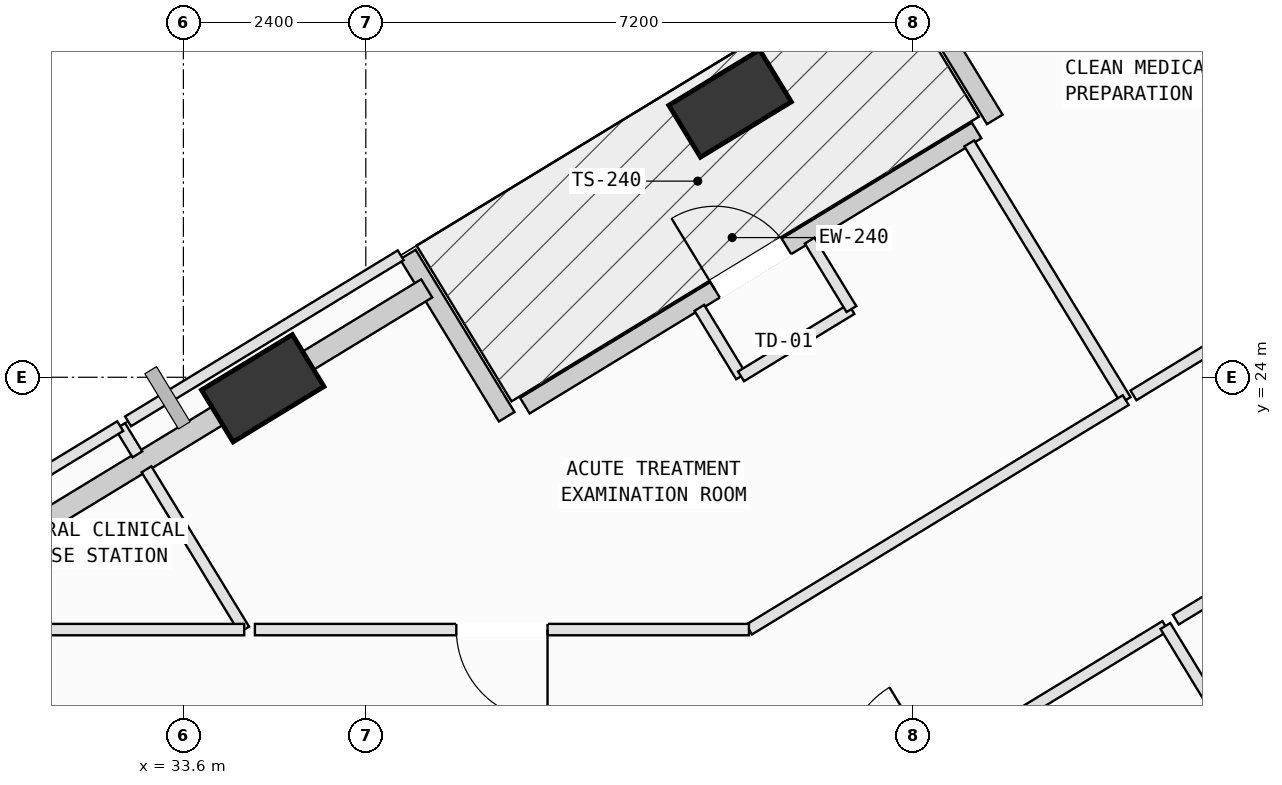
"""IFC4 building model, lengths in metres.
Left out: names, types, materials, properties, quantities, classifications, styles, units other than length and angle.
Written with IfcOpenShell. Run it as: python <this file> out.ifc"""

import sys

from ifc_helpers import new_model, si_unit, direction, frame, frame_2d, origin, origin_2d, place, context, subcontext, project, spatial, rectangle, extrude, element, fill, save


model = new_model("IFC4")
c1 = context("Model", 3, precision=1e-05, world=origin(), true_north=direction((0.0, 1.0)))
c2 = subcontext(c1, "Body", "Model", "MODEL_VIEW")
j1 = project(units=[si_unit("LENGTHUNIT", "METRE"), si_unit("PLANEANGLEUNIT", "RADIAN")], contexts=[c1])
p1 = place(None, origin())
s1 = spatial("IfcSite", under=j1, at=p1, CompositionType="ELEMENT")
p2 = place(p1, origin())
s2 = spatial("IfcBuilding", under=s1, at=p2, CompositionType="ELEMENT")
p3 = place(p2, frame((0.0, 0.0, 157.8)))
s3 = spatial("IfcBuildingStorey", under=s2, at=p3, CompositionType="ELEMENT", Elevation=157.8)
p4 = place(p3, frame((40.793, 27.601, 0.002), z_axis=(-0.011845597943, 0.029736114424, 0.999487591373), x_axis=(-0.600934371132, -0.799124871358, 0.016652974791)))
e1 = element("IfcColumn", 1, at=p4, inside=s3, PredefinedType="COLUMN", context=c2, shape_type="SweptSolid", body=[
    extrude(rectangle(XDim=1.4, YDim=0.8, at=origin_2d()), origin(), (0.0, 0.0, 1.0), 3.998),
])
p5 = place(p3, frame((34.644, 23.855, 0.002), z_axis=(0.003848673761, 0.004337394239, 0.999983187219), x_axis=(-0.984086368833, 0.177665182712, 0.003016874168)))
e2 = element("IfcColumn", 2, at=p5, inside=s3, PredefinedType="COLUMN", context=c2, shape_type="SweptSolid", body=[
    extrude(rectangle(XDim=1.4, YDim=0.8, at=origin_2d()), origin(), (0.0, 0.0, 1.0), 3.996),
])
p6 = place(p3, frame((38.093, 23.626, 0.0), z_axis=(0.0, 0.0, 1.0), x_axis=(0.854000704192, 0.520271849363, 0.0)))
e3 = element("IfcWall", 3, at=p6, inside=s3, PredefinedType="SOLIDWALL", context=c2, shape_type="SweptSolid", body=[
    extrude(rectangle(XDim=6.96, YDim=0.24, at=frame_2d((3.48, 0.0))), origin(), (0.0, 0.0, 1.0), 3.165),
])
p7 = place(p6, frame((2.93, 0.0, 0.0)))
e4 = element("IfcOpeningElement", 4, at=p7, cuts=e3, PredefinedType="OPENING", context=c2, shape_type="SweptSolid", body=[
    extrude(rectangle(XDim=1.1, YDim=2.15, at=frame_2d((0.55, 1.075))), frame((0.0, 0.13, 0.0), z_axis=(0.0, -1.0, 0.0), x_axis=(1.0, 0.0, 0.0)), (0.0, 0.0, 1.0), 0.26),
])
for number, where, z_axis, x_axis in (
    (5, (36.553, 25.615, 0.0), (0.0, 0.0, 1.0), (0.52, -0.854, 0.0)),
    (6, (44.276, 27.393, 0.0), (0.0, 0.0, 1.0), (-0.52, 0.854, 0.0)),
):
    element("IfcWall", number, at=place(p3, frame(where, z_axis=z_axis, x_axis=x_axis)), inside=s3, PredefinedType="SOLIDWALL", context=c2, shape_type="SweptSolid", body=[
        extrude(rectangle(XDim=2.5, YDim=0.24, at=frame_2d((1.25, 0.0))), origin(), (0.0, 0.0, 1.0), 3.165),
    ])
p8 = place(p3, frame((35.077, 24.119, 0.0), z_axis=(0.0, 0.0, 1.0), x_axis=(0.853983619902, 0.52029989135, 0.0)))
e7 = element("IfcWall", 7, at=p8, inside=s3, PredefinedType="SOLIDWALL", context=c2, shape_type="SweptSolid", body=[
    extrude(rectangle(XDim=2.019, YDim=0.28, at=frame_2d((1.009, 0.0))), origin(), (0.0, 0.0, 1.0), 3.145),
])
p9 = place(p3, frame((29.14, 20.502, 0.0), z_axis=(0.0, 0.0, 1.0), x_axis=(0.853999949141, 0.52027308874, 0.0)))
e8 = element("IfcWall", 8, at=p9, inside=s3, PredefinedType="SOLIDWALL", context=c2, shape_type="SweptSolid", body=[
    extrude(rectangle(XDim=5.96, YDim=0.28, at=frame_2d((2.98, 0.0))), origin(), (0.0, 0.0, 1.0), 3.165),
])
p10 = place(p3, frame((39.483, 16.44, 0.0), z_axis=(0.0, 0.0, 1.0), x_axis=(0.854001681797, 0.520270244669, 0.0)))
e9 = element("IfcWall", 9, at=p10, inside=s3, PredefinedType="PARTITIONING", context=c2, shape_type="SweptSolid", body=[
    extrude(rectangle(XDim=8.24, YDim=0.15, at=frame_2d((4.12, 0.0))), origin(), (0.0, 0.0, 1.0), 3.78),
])
p11 = place(p10, frame((3.52, 0.0, 0.0)))
e10 = element("IfcOpeningElement", 10, at=p11, cuts=e9, PredefinedType="OPENING", context=c2, shape_type="SweptSolid", body=[
    extrude(rectangle(XDim=1.2, YDim=2.15, at=frame_2d((0.6, 1.075))), frame((0.0, 0.085, 0.0), z_axis=(0.0, -1.0, 0.0), x_axis=(1.0, 0.0, 0.0)), (0.0, 0.0, 1.0), 0.17),
])
p12 = place(p3, frame((46.52, 20.727, 0.0), z_axis=(0.0, 0.0, 1.0), x_axis=(0.520257122218, -0.854009676047, 0.0)))
e11 = element("IfcWall", 11, at=p12, inside=s3, PredefinedType="PARTITIONING", context=c2, shape_type="SweptSolid", body=[
    extrude(rectangle(XDim=11.935, YDim=0.15, at=frame_2d((5.967, 0.0))), origin(), (0.0, 0.0, 1.0), 3.415),
])
p13 = place(p3, frame((46.657, 20.811, 0.0), z_axis=(0.0, 0.0, 1.0), x_axis=(0.85402865448, 0.520225967563, 0.0)))
e12 = element("IfcWall", 12, at=p13, inside=s3, PredefinedType="PARTITIONING", context=c2, shape_type="SweptSolid", body=[
    extrude(rectangle(XDim=5.44, YDim=0.15, at=frame_2d((2.72, 0.0))), origin(), (0.0, 0.0, 1.0), 3.065),
])
p14 = place(p13, frame((2.12, 0.0, 0.0)))
e13 = element("IfcOpeningElement", 13, at=p14, cuts=e12, PredefinedType="OPENING", context=c2, shape_type="SweptSolid", body=[
    extrude(rectangle(XDim=1.2, YDim=2.15, at=frame_2d((0.6, 1.075))), frame((0.0, 0.085, 0.0), z_axis=(0.0, -1.0, 0.0), x_axis=(1.0, 0.0, 0.0)), (0.0, 0.0, 1.0), 0.17),
])
p15 = place(p3, frame((32.769, 23.357, 0.0), z_axis=(0.0, 0.0, 1.0), x_axis=(0.519519720365, -0.854458460168, 0.0)))
e14 = element("IfcWall", 14, at=p15, inside=s3, PredefinedType="PARTITIONING", context=c2, shape_type="SweptSolid", body=[
    extrude(rectangle(XDim=0.435, YDim=0.15, at=frame_2d((0.218, 0.0))), origin(), (0.0, 0.0, 1.0), 3.78),
])
p16 = place(p3, frame((33.115, 22.789, 0.0), z_axis=(0.0, 0.0, 1.0), x_axis=(0.520269924508, -0.854001876843, 0.0)))
e15 = element("IfcWall", 15, at=p16, inside=s3, PredefinedType="PARTITIONING", context=c2, shape_type="SweptSolid", body=[
    extrude(rectangle(XDim=2.47, YDim=0.15, at=frame_2d((1.235, 0.0))), origin(), (0.0, 0.0, 1.0), 3.78),
])
p17 = place(p3, frame((34.4, 20.68, 0.0), z_axis=(0.0, 0.0, 1.0), x_axis=(-1.0, 0.0, 0.0)))
e16 = element("IfcWall", 16, at=p17, inside=s3, PredefinedType="PARTITIONING", context=c2, shape_type="SweptSolid", body=[
    extrude(rectangle(XDim=3.2, YDim=0.15, at=frame_2d((1.6, 0.0))), origin(), (0.0, 0.0, 1.0), 3.78),
])
p18 = place(p3, frame((28.892, 20.995, 0.0), z_axis=(0.0, 0.0, 1.0), x_axis=(0.854009494037, 0.52025742099, 0.0)))
e17 = element("IfcWall", 17, at=p18, inside=s3, PredefinedType="PARTITIONING", context=c2, shape_type="SweptSolid", body=[
    extrude(rectangle(XDim=4.54, YDim=0.15, at=frame_2d((2.27, 0.0))), origin(), (0.0, 0.0, 1.0), 3.78),
])
p19 = place(p3, frame((40.388, 24.913, 0.0), z_axis=(0.0, 0.0, 1.0), x_axis=(0.520335902325, -0.853961678737, 0.0)))
e18 = element("IfcWall", 18, at=p19, inside=s3, PredefinedType="PARTITIONING", context=c2, shape_type="SweptSolid", body=[
    extrude(rectangle(XDim=1.055, YDim=0.15, at=frame_2d((0.528, 0.0))), origin(), (0.0, 0.0, 1.0), 3.78),
])
p20 = place(p3, frame((40.937, 24.012, 0.0), z_axis=(0.0, 0.0, 1.0), x_axis=(0.853873996169, 0.520479777385, 0.0)))
e19 = element("IfcWall", 19, at=p20, inside=s3, PredefinedType="PARTITIONING", context=c2, shape_type="SweptSolid", body=[
    extrude(rectangle(XDim=1.7, YDim=0.15, at=frame_2d((0.85, 0.0))), origin(), (0.0, 0.0, 1.0), 3.065),
])
p21 = place(p3, frame((42.389, 24.897, 0.0), z_axis=(0.0, 0.0, 1.0), x_axis=(-0.520167150094, 0.85406447998, 0.0)))
e20 = element("IfcWall", 20, at=p21, inside=s3, PredefinedType="PARTITIONING", context=c2, shape_type="SweptSolid", body=[
    extrude(rectangle(XDim=1.055, YDim=0.15, at=frame_2d((0.528, 0.0))), origin(), (0.0, 0.0, 1.0), 3.78),
])
p22 = place(p3, frame((43.94, 27.077, 0.0), z_axis=(0.0, 0.0, 1.0), x_axis=(0.52031109825, -0.853976791861, 0.0)))
e21 = element("IfcWall", 21, at=p22, inside=s3, PredefinedType="PARTITIONING", context=c2, shape_type="SweptSolid", body=[
    extrude(rectangle(XDim=3.956, YDim=0.15, at=frame_2d((1.978, 0.0))), origin(), (0.0, 0.0, 1.0), 3.415),
])
p23 = place(p3, frame((45.998, 23.699, 0.0), z_axis=(0.0, 0.0, 1.0), x_axis=(-0.854066940543, -0.520163110065, 0.0)))
e22 = element("IfcWall", 22, at=p23, inside=s3, PredefinedType="PARTITIONING", context=c2, shape_type="SweptSolid", body=[
    extrude(rectangle(XDim=5.804, YDim=0.15, at=frame_2d((2.902, 0.0))), origin(), (0.0, 0.0, 1.0), 3.78),
])
p24 = place(p3, frame((41.041, 20.68, 0.0), z_axis=(0.0, 0.0, 1.0), x_axis=(-1.0, 0.0, 0.0)))
e23 = element("IfcWall", 23, at=p24, inside=s3, PredefinedType="PARTITIONING", context=c2, shape_type="SweptSolid", body=[
    extrude(rectangle(XDim=6.5, YDim=0.15, at=frame_2d((3.25, 0.0))), origin(), (0.0, 0.0, 1.0), 3.415),
])
p25 = place(p24, frame((2.65, 0.0, 0.0)))
e24 = element("IfcOpeningElement", 24, at=p25, cuts=e23, PredefinedType="OPENING", context=c2, shape_type="SweptSolid", body=[
    extrude(rectangle(XDim=1.2, YDim=2.15, at=frame_2d((0.6, 1.075))), frame((0.0, 0.085, 0.0), z_axis=(0.0, -1.0, 0.0), x_axis=(1.0, 0.0, 0.0)), (0.0, 0.0, 1.0), 0.17),
])
p26 = place(p3, frame((32.872, 23.42, 0.0), z_axis=(0.0, 0.0, 1.0), x_axis=(0.854016662938, 0.52024565296, 0.0)))
e25 = element("IfcWall", 25, at=p26, inside=s3, PredefinedType="PARTITIONING", context=c2, shape_type="SweptSolid", body=[
    extrude(rectangle(XDim=4.2, YDim=0.15, at=frame_2d((2.1, 0.0))), origin(), (0.0, 0.0, 1.0), 3.78),
])
p27 = place(p3, frame((52.339, 27.562, 0.0), z_axis=(0.0, 0.0, 1.0), x_axis=(-0.85405331728, -0.520185477733, 0.0)))
e26 = element("IfcWall", 26, at=p27, inside=s3, PredefinedType="PARTITIONING", context=c2, shape_type="SweptSolid", body=[
    extrude(rectangle(XDim=7.305, YDim=0.15, at=frame_2d((3.653, 0.0))), origin(), (0.0, 0.0, 1.0), 3.78),
])
p28 = place(p27, frame((3.052, 0.0, 0.0)))
e27 = element("IfcOpeningElement", 27, at=p28, cuts=e26, PredefinedType="OPENING", context=c2, shape_type="SweptSolid", body=[
    extrude(rectangle(XDim=1.2, YDim=2.15, at=frame_2d((0.6, 1.075))), frame((0.0, 0.085, 0.0), z_axis=(0.0, -1.0, 0.0), x_axis=(1.0, 0.0, 0.0)), (0.0, 0.0, 1.0), 0.17),
])
p29 = place(p7, origin())
e28 = element("IfcDoor", 28, at=p29, inside=s3, OperationType="SINGLE_SWING_LEFT", PredefinedType="DOOR", context=c2, shape_type="SweptSolid", body=[
    extrude(rectangle(XDim=1.1, YDim=2.15, at=frame_2d((0.55, 1.075))), frame((0.0, 0.025, 0.0), z_axis=(0.0, -1.0, 0.0), x_axis=(1.0, 0.0, 0.0)), (0.0, 0.0, 1.0), 0.05),
])
fill(e4, e28)
p30 = place(p25, origin())
e29 = element("IfcDoor", 29, at=p30, inside=s3, OperationType="SINGLE_SWING_LEFT", PredefinedType="DOOR", context=c2, shape_type="SweptSolid", body=[
    extrude(rectangle(XDim=1.2, YDim=2.15, at=frame_2d((0.6, 1.075))), frame((0.0, 0.025, 0.0), z_axis=(0.0, -1.0, 0.0), x_axis=(1.0, 0.0, 0.0)), (0.0, 0.0, 1.0), 0.05),
])
fill(e24, e29)
save(model, sys.argv[1])
